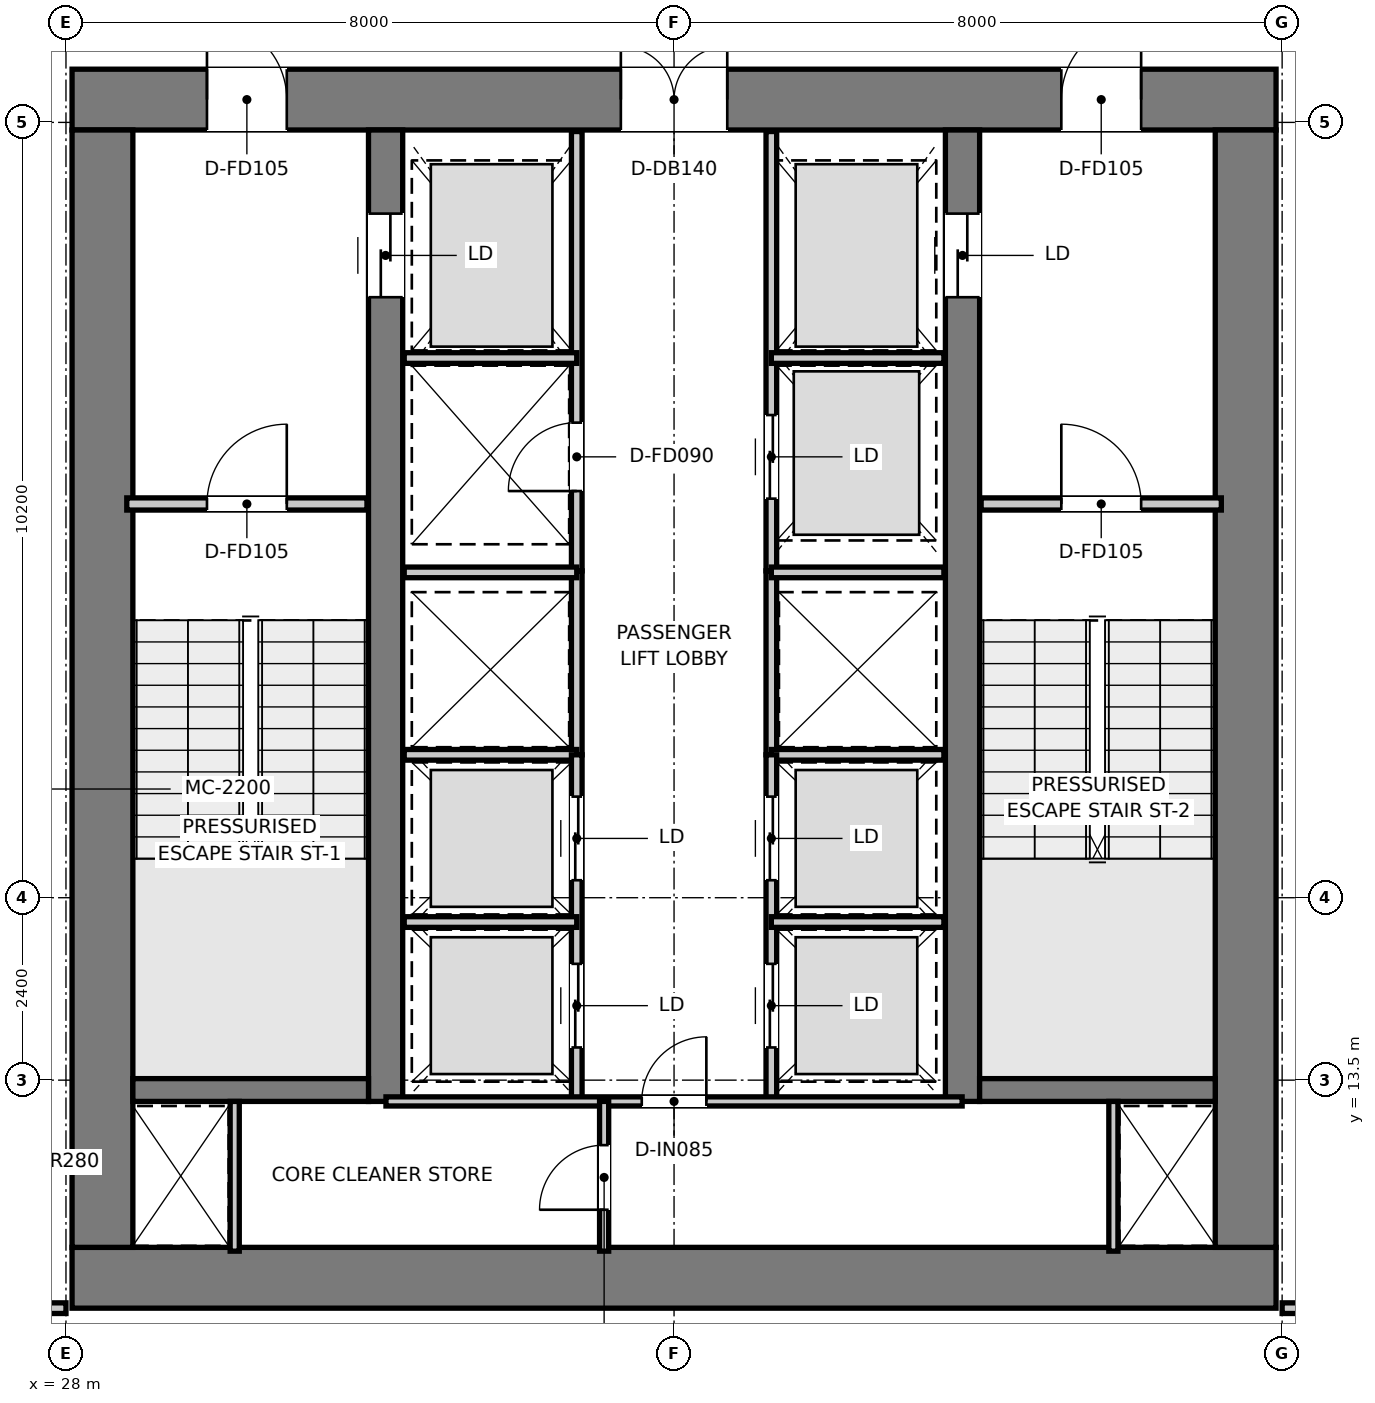
"""IFC4 building model, lengths in metres.
Left out: names, types, materials, properties, quantities, classifications, styles, units other than length and angle.
Written with IfcOpenShell. Run it as: python <this file> out.ifc"""

import sys

from ifc_helpers import new_model, si_unit, direction, frame, frame_2d, origin, place, context, subcontext, project, spatial, rectangle, extrude, element, fill, save


model = new_model("IFC4")
c1 = context("Model", 3, precision=1e-05, world=origin(), true_north=direction((0.0, 1.0)))
c2 = subcontext(c1, "Body", "Model", "MODEL_VIEW")
j1 = project(units=[si_unit("LENGTHUNIT", "METRE"), si_unit("PLANEANGLEUNIT", "RADIAN")], contexts=[c1])
p1 = place(None, origin())
s1 = spatial("IfcSite", under=j1, at=p1, CompositionType="ELEMENT")
p2 = place(p1, origin())
s2 = spatial("IfcBuilding", under=s1, at=p2, CompositionType="ELEMENT")
p3 = place(p2, frame((0.0, 0.0, 36.85)))
s3 = spatial("IfcBuildingStorey", under=s2, at=p3, CompositionType="ELEMENT", Elevation=36.85)
p4 = place(p3, frame((28.08, 10.9, 0.0), z_axis=(0.0, 0.0, 1.0), x_axis=(1.0, 0.0, 0.0)))
e1 = element("IfcWall", 1, at=p4, inside=s3, PredefinedType="SHEAR", context=c2, shape_type="SweptSolid", body=[
    extrude(rectangle(XDim=15.84, YDim=0.8, at=frame_2d((7.92, 0.0))), origin(), (0.0, 0.0, 1.0), 3.95),
])
p5 = place(p3, frame((28.08, 26.4, 0.0), z_axis=(0.0, 0.0, 1.0), x_axis=(1.0, 0.0, 0.0)))
e2 = element("IfcWall", 2, at=p5, inside=s3, PredefinedType="SHEAR", context=c2, shape_type="SweptSolid", body=[
    extrude(rectangle(XDim=15.84, YDim=0.8, at=frame_2d((7.92, 0.0))), origin(), (0.0, 0.0, 1.0), 3.95),
])
p6 = place(p5, frame((7.22, 0.0, 0.0)))
e3 = element("IfcOpeningElement", 3, at=p6, cuts=e2, PredefinedType="OPENING", context=c2, shape_type="SweptSolid", body=[
    extrude(rectangle(XDim=1.4, YDim=2.2, at=frame_2d((0.7, 1.1))), frame((0.0, 0.41, 0.0), z_axis=(0.0, -1.0, 0.0), x_axis=(1.0, 0.0, 0.0)), (0.0, 0.0, 1.0), 0.82),
])
p7 = place(p5, frame((1.775, 0.0, 0.0)))
e4 = element("IfcOpeningElement", 4, at=p7, cuts=e2, PredefinedType="OPENING", context=c2, shape_type="SweptSolid", body=[
    extrude(rectangle(XDim=1.05, YDim=2.1, at=frame_2d((0.525, 1.05))), frame((0.0, 0.41, 0.0), z_axis=(0.0, -1.0, 0.0), x_axis=(1.0, 0.0, 0.0)), (0.0, 0.0, 1.0), 0.82),
])
p8 = place(p5, frame((13.015, 0.0, 0.0)))
e5 = element("IfcOpeningElement", 5, at=p8, cuts=e2, PredefinedType="OPENING", context=c2, shape_type="SweptSolid", body=[
    extrude(rectangle(XDim=1.05, YDim=2.1, at=frame_2d((0.525, 1.05))), frame((0.0, 0.41, 0.0), z_axis=(0.0, -1.0, 0.0), x_axis=(1.0, 0.0, 0.0)), (0.0, 0.0, 1.0), 0.82),
])
for number, where, z_axis, x_axis in (
    (6, (28.48, 11.3, 0.0), (0.0, 0.0, 1.0), (0.0, 1.0, 0.0)),
    (7, (43.52, 11.3, 0.0), (0.0, 0.0, 1.0), (0.0, 1.0, 0.0)),
):
    element("IfcWall", number, at=place(p3, frame(where, z_axis=z_axis, x_axis=x_axis)), inside=s3, PredefinedType="SHEAR", context=c2, shape_type="SweptSolid", body=[
        extrude(rectangle(XDim=14.7, YDim=0.8, at=frame_2d((7.35, 0.0))), origin(), (0.0, 0.0, 1.0), 3.95),
    ])
p9 = place(p3, frame((32.205, 13.22, 0.0), z_axis=(0.0, 0.0, 1.0), x_axis=(0.0, 1.0, 0.0)))
e8 = element("IfcWall", 8, at=p9, inside=s3, PredefinedType="SHEAR", context=c2, shape_type="SweptSolid", body=[
    extrude(rectangle(XDim=12.78, YDim=0.45, at=frame_2d((6.39, 0.0))), origin(), (0.0, 0.0, 1.0), 3.95),
])
p10 = place(p9, frame((10.58, 0.0, 0.0)))
e9 = element("IfcOpeningElement", 9, at=p10, cuts=e8, PredefinedType="OPENING", context=c2, shape_type="SweptSolid", body=[
    extrude(rectangle(XDim=1.1, YDim=2.15, at=frame_2d((0.55, 1.075))), frame((0.0, 0.235, 0.0), z_axis=(0.0, -1.0, 0.0), x_axis=(1.0, 0.0, 0.0)), (0.0, 0.0, 1.0), 0.47),
])
p11 = place(p3, frame((39.795, 13.22, 0.0), z_axis=(0.0, 0.0, 1.0), x_axis=(0.0, 1.0, 0.0)))
e10 = element("IfcWall", 10, at=p11, inside=s3, PredefinedType="SHEAR", context=c2, shape_type="SweptSolid", body=[
    extrude(rectangle(XDim=12.78, YDim=0.45, at=frame_2d((6.39, 0.0))), origin(), (0.0, 0.0, 1.0), 3.95),
])
p12 = place(p11, frame((10.58, 0.0, 0.0)))
e11 = element("IfcOpeningElement", 11, at=p12, cuts=e10, PredefinedType="OPENING", context=c2, shape_type="SweptSolid", body=[
    extrude(rectangle(XDim=1.1, YDim=2.15, at=frame_2d((0.55, 1.075))), frame((0.0, 0.235, 0.0), z_axis=(0.0, -1.0, 0.0), x_axis=(1.0, 0.0, 0.0)), (0.0, 0.0, 1.0), 0.47),
])
for number, where, z_axis, x_axis in (
    (12, (28.88, 13.37, 0.0), (0.0, 0.0, 1.0), (1.0, 0.0, 0.0)),
    (13, (40.02, 13.37, 0.0), (0.0, 0.0, 1.0), (1.0, 0.0, 0.0)),
):
    element("IfcWall", number, at=place(p3, frame(where, z_axis=z_axis, x_axis=x_axis)), inside=s3, PredefinedType="SHEAR", context=c2, shape_type="SweptSolid", body=[
        extrude(rectangle(XDim=3.1, YDim=0.3, at=frame_2d((1.55, 0.0))), origin(), (0.0, 0.0, 1.0), 3.95),
    ])
p13 = place(p3, frame((28.8, 21.08, 0.0), z_axis=(0.0, 0.0, 1.0), x_axis=(1.0, 0.0, 0.0)))
e14 = element("IfcWall", 14, at=p13, inside=s3, PredefinedType="PARTITIONING", context=c2, shape_type="SweptSolid", body=[
    extrude(rectangle(XDim=3.16, YDim=0.16, at=frame_2d((1.58, 0.0))), origin(), (0.0, 0.0, 1.0), 3.67),
])
p14 = place(p13, frame((1.055, 0.0, 0.0)))
e15 = element("IfcOpeningElement", 15, at=p14, cuts=e14, PredefinedType="OPENING", context=c2, shape_type="SweptSolid", body=[
    extrude(rectangle(XDim=1.05, YDim=2.1, at=frame_2d((0.525, 1.05))), frame((0.0, 0.09, 0.0), z_axis=(0.0, -1.0, 0.0), x_axis=(1.0, 0.0, 0.0)), (0.0, 0.0, 1.0), 0.18),
])
p15 = place(p3, frame((40.04, 21.08, 0.0), z_axis=(0.0, 0.0, 1.0), x_axis=(1.0, 0.0, 0.0)))
e16 = element("IfcWall", 16, at=p15, inside=s3, PredefinedType="PARTITIONING", context=c2, shape_type="SweptSolid", body=[
    extrude(rectangle(XDim=3.16, YDim=0.16, at=frame_2d((1.58, 0.0))), origin(), (0.0, 0.0, 1.0), 3.67),
])
p16 = place(p15, frame((1.055, 0.0, 0.0)))
e17 = element("IfcOpeningElement", 17, at=p16, cuts=e16, PredefinedType="OPENING", context=c2, shape_type="SweptSolid", body=[
    extrude(rectangle(XDim=1.05, YDim=2.1, at=frame_2d((0.525, 1.05))), frame((0.0, 0.09, 0.0), z_axis=(0.0, -1.0, 0.0), x_axis=(1.0, 0.0, 0.0)), (0.0, 0.0, 1.0), 0.18),
])
p17 = place(p3, frame((34.72, 20.2, 0.0), z_axis=(0.0, 0.0, 1.0), x_axis=(0.0, 1.0, 0.0)))
e18 = element("IfcWall", 18, at=p17, inside=s3, PredefinedType="PARTITIONING", context=c2, shape_type="SweptSolid", body=[
    extrude(rectangle(XDim=5.78, YDim=0.14, at=frame_2d((2.89, 0.0))), origin(), (0.0, 0.0, 1.0), 2.47),
])
p18 = place(p17, frame((1.05, 0.0, 0.0)))
e19 = element("IfcOpeningElement", 19, at=p18, cuts=e18, PredefinedType="OPENING", context=c2, shape_type="SweptSolid", body=[
    extrude(rectangle(XDim=0.9, YDim=2.1, at=frame_2d((0.45, 1.05))), frame((0.0, 0.08, 0.0), z_axis=(0.0, -1.0, 0.0), x_axis=(1.0, 0.0, 0.0)), (0.0, 0.0, 1.0), 0.16),
])
p19 = place(p3, frame((37.28, 20.2, 0.0), z_axis=(0.0, 0.0, 1.0), x_axis=(0.0, 1.0, 0.0)))
e20 = element("IfcWall", 20, at=p19, inside=s3, PredefinedType="PARTITIONING", context=c2, shape_type="SweptSolid", body=[
    extrude(rectangle(XDim=5.78, YDim=0.14, at=frame_2d((2.89, 0.0))), origin(), (0.0, 0.0, 1.0), 2.47),
])
p20 = place(p19, frame((0.95, 0.0, 0.0)))
e21 = element("IfcOpeningElement", 21, at=p20, cuts=e20, PredefinedType="OPENING", context=c2, shape_type="SweptSolid", body=[
    extrude(rectangle(XDim=1.1, YDim=2.15, at=frame_2d((0.55, 1.075))), frame((0.0, 0.08, 0.0), z_axis=(0.0, -1.0, 0.0), x_axis=(1.0, 0.0, 0.0)), (0.0, 0.0, 1.0), 0.16),
])
for number, where, z_axis, x_axis in (
    (22, (32.45, 23.0, 0.0), (0.0, 0.0, 1.0), (1.0, 0.0, 0.0)),
    (23, (37.28, 23.0, 0.0), (0.0, 0.0, 1.0), (1.0, 0.0, 0.0)),
):
    element("IfcWall", number, at=place(p3, frame(where, z_axis=z_axis, x_axis=x_axis)), inside=s3, PredefinedType="PARTITIONING", context=c2, shape_type="SweptSolid", body=[
        extrude(rectangle(XDim=2.27, YDim=0.14, at=frame_2d((1.135, 0.0))), origin(), (0.0, 0.0, 1.0), 2.47),
    ])
for number, where, z_axis, x_axis in (
    (24, (34.72, 17.78, 0.0), (0.0, 0.0, 1.0), (0.0, 1.0, 0.0)),
    (25, (37.28, 17.78, 0.0), (0.0, 0.0, 1.0), (0.0, 1.0, 0.0)),
):
    element("IfcWall", number, at=place(p3, frame(where, z_axis=z_axis, x_axis=x_axis)), inside=s3, PredefinedType="PARTITIONING", context=c2, shape_type="SweptSolid", body=[
        extrude(rectangle(XDim=2.42, YDim=0.14, at=frame_2d((1.21, 0.0))), origin(), (0.0, 0.0, 1.0), 3.67),
    ])
for number, where, z_axis, x_axis in (
    (26, (32.45, 17.78, 0.0), (0.0, 0.0, 1.0), (1.0, 0.0, 0.0)),
    (27, (32.45, 20.18, 0.0), (0.0, 0.0, 1.0), (1.0, 0.0, 0.0)),
    (28, (37.28, 17.78, 0.0), (0.0, 0.0, 1.0), (1.0, 0.0, 0.0)),
    (29, (37.28, 20.18, 0.0), (0.0, 0.0, 1.0), (1.0, 0.0, 0.0)),
):
    element("IfcWall", number, at=place(p3, frame(where, z_axis=z_axis, x_axis=x_axis)), inside=s3, PredefinedType="PARTITIONING", context=c2, shape_type="SweptSolid", body=[
        extrude(rectangle(XDim=2.27, YDim=0.14, at=frame_2d((1.135, 0.0))), origin(), (0.0, 0.0, 1.0), 3.67),
    ])
p21 = place(p3, frame((34.72, 13.22, 0.0), z_axis=(0.0, 0.0, 1.0), x_axis=(0.0, 1.0, 0.0)))
e30 = element("IfcWall", 30, at=p21, inside=s3, PredefinedType="PARTITIONING", context=c2, shape_type="SweptSolid", body=[
    extrude(rectangle(XDim=4.56, YDim=0.14, at=frame_2d((2.28, 0.0))), origin(), (0.0, 0.0, 1.0), 3.67),
])
p22 = place(p21, frame((0.71, 0.0, 0.0)))
e31 = element("IfcOpeningElement", 31, at=p22, cuts=e30, PredefinedType="OPENING", context=c2, shape_type="SweptSolid", body=[
    extrude(rectangle(XDim=1.1, YDim=2.15, at=frame_2d((0.55, 1.075))), frame((0.0, 0.08, 0.0), z_axis=(0.0, -1.0, 0.0), x_axis=(1.0, 0.0, 0.0)), (0.0, 0.0, 1.0), 0.16),
])
p23 = place(p21, frame((2.91, 0.0, 0.0)))
e32 = element("IfcOpeningElement", 32, at=p23, cuts=e30, PredefinedType="OPENING", context=c2, shape_type="SweptSolid", body=[
    extrude(rectangle(XDim=1.1, YDim=2.15, at=frame_2d((0.55, 1.075))), frame((0.0, 0.08, 0.0), z_axis=(0.0, -1.0, 0.0), x_axis=(1.0, 0.0, 0.0)), (0.0, 0.0, 1.0), 0.16),
])
p24 = place(p3, frame((32.45, 15.58, 0.0), z_axis=(0.0, 0.0, 1.0), x_axis=(1.0, 0.0, 0.0)))
e33 = element("IfcWall", 33, at=p24, inside=s3, PredefinedType="PARTITIONING", context=c2, shape_type="SweptSolid", body=[
    extrude(rectangle(XDim=2.27, YDim=0.14, at=frame_2d((1.135, 0.0))), origin(), (0.0, 0.0, 1.0), 3.67),
])
p25 = place(p3, frame((37.28, 13.22, 0.0), z_axis=(0.0, 0.0, 1.0), x_axis=(0.0, 1.0, 0.0)))
e34 = element("IfcWall", 34, at=p25, inside=s3, PredefinedType="PARTITIONING", context=c2, shape_type="SweptSolid", body=[
    extrude(rectangle(XDim=4.56, YDim=0.14, at=frame_2d((2.28, 0.0))), origin(), (0.0, 0.0, 1.0), 3.67),
])
p26 = place(p25, frame((0.71, 0.0, 0.0)))
e35 = element("IfcOpeningElement", 35, at=p26, cuts=e34, PredefinedType="OPENING", context=c2, shape_type="SweptSolid", body=[
    extrude(rectangle(XDim=1.1, YDim=2.15, at=frame_2d((0.55, 1.075))), frame((0.0, 0.08, 0.0), z_axis=(0.0, -1.0, 0.0), x_axis=(1.0, 0.0, 0.0)), (0.0, 0.0, 1.0), 0.16),
])
p27 = place(p25, frame((2.91, 0.0, 0.0)))
e36 = element("IfcOpeningElement", 36, at=p27, cuts=e34, PredefinedType="OPENING", context=c2, shape_type="SweptSolid", body=[
    extrude(rectangle(XDim=1.1, YDim=2.15, at=frame_2d((0.55, 1.075))), frame((0.0, 0.08, 0.0), z_axis=(0.0, -1.0, 0.0), x_axis=(1.0, 0.0, 0.0)), (0.0, 0.0, 1.0), 0.16),
])
p28 = place(p3, frame((37.28, 15.58, 0.0), z_axis=(0.0, 0.0, 1.0), x_axis=(1.0, 0.0, 0.0)))
e37 = element("IfcWall", 37, at=p28, inside=s3, PredefinedType="PARTITIONING", context=c2, shape_type="SweptSolid", body=[
    extrude(rectangle(XDim=2.27, YDim=0.14, at=frame_2d((1.135, 0.0))), origin(), (0.0, 0.0, 1.0), 3.67),
])
for number, where, z_axis, x_axis in (
    (38, (30.22, 11.25, 0.0), (0.0, 0.0, 1.0), (0.0, 1.0, 0.0)),
    (39, (41.78, 11.25, 0.0), (0.0, 0.0, 1.0), (0.0, 1.0, 0.0)),
):
    element("IfcWall", number, at=place(p3, frame(where, z_axis=z_axis, x_axis=x_axis)), inside=s3, PredefinedType="PARTITIONING", context=c2, shape_type="SweptSolid", body=[
        extrude(rectangle(XDim=1.97, YDim=0.12, at=frame_2d((0.985, 0.0))), origin(), (0.0, 0.0, 1.0), 3.67),
    ])
p29 = place(p3, frame((32.21, 13.22, 0.0), z_axis=(0.0, 0.0, 1.0), x_axis=(1.0, 0.0, 0.0)))
e40 = element("IfcWall", 40, at=p29, inside=s3, PredefinedType="PARTITIONING", context=c2, shape_type="SweptSolid", body=[
    extrude(rectangle(XDim=7.58, YDim=0.12, at=frame_2d((3.79, 0.0))), origin(), (0.0, 0.0, 1.0), 3.67),
])
p30 = place(p29, frame((3.365, 0.0, 0.0)))
e41 = element("IfcOpeningElement", 41, at=p30, cuts=e40, PredefinedType="OPENING", context=c2, shape_type="SweptSolid", body=[
    extrude(rectangle(XDim=0.85, YDim=2.1, at=frame_2d((0.425, 1.05))), frame((0.0, 0.07, 0.0), z_axis=(0.0, -1.0, 0.0), x_axis=(1.0, 0.0, 0.0)), (0.0, 0.0, 1.0), 0.14),
])
p31 = place(p3, frame((35.08, 11.25, 0.0), z_axis=(0.0, 0.0, 1.0), x_axis=(0.0, 1.0, 0.0)))
e42 = element("IfcWall", 42, at=p31, inside=s3, PredefinedType="PARTITIONING", context=c2, shape_type="SweptSolid", body=[
    extrude(rectangle(XDim=1.97, YDim=0.12, at=frame_2d((0.985, 0.0))), origin(), (0.0, 0.0, 1.0), 3.67),
])
p32 = place(p31, frame((0.545, 0.0, 0.0)))
e43 = element("IfcOpeningElement", 43, at=p32, cuts=e42, PredefinedType="OPENING", context=c2, shape_type="SweptSolid", body=[
    extrude(rectangle(XDim=0.85, YDim=2.1, at=frame_2d((0.425, 1.05))), frame((0.0, 0.07, 0.0), z_axis=(0.0, -1.0, 0.0), x_axis=(1.0, 0.0, 0.0)), (0.0, 0.0, 1.0), 0.14),
])
p33 = place(p3, frame((26.32, 10.5, 0.0), z_axis=(0.0, 0.0, 1.0), x_axis=(1.0, 0.0, 0.0)))
e44 = element("IfcWall", 44, at=p33, inside=s3, PredefinedType="PARTITIONING", context=c2, shape_type="SweptSolid", body=[
    extrude(rectangle(XDim=1.68, YDim=0.14, at=frame_2d((0.84, 0.0))), origin(), (0.0, 0.0, 1.0), 3.67),
])
p34 = place(p33, frame((0.445, 0.0, 0.0)))
e45 = element("IfcOpeningElement", 45, at=p34, cuts=e44, PredefinedType="OPENING", context=c2, shape_type="SweptSolid", body=[
    extrude(rectangle(XDim=0.85, YDim=2.1, at=frame_2d((0.425, 1.05))), frame((0.0, 0.08, 0.0), z_axis=(0.0, -1.0, 0.0), x_axis=(1.0, 0.0, 0.0)), (0.0, 0.0, 1.0), 0.16),
])
p35 = place(p3, frame((44.0, 10.5, 0.0), z_axis=(0.0, 0.0, 1.0), x_axis=(1.0, 0.0, 0.0)))
e46 = element("IfcWall", 46, at=p35, inside=s3, PredefinedType="PARTITIONING", context=c2, shape_type="SweptSolid", body=[
    extrude(rectangle(XDim=1.68, YDim=0.14, at=frame_2d((0.84, 0.0))), origin(), (0.0, 0.0, 1.0), 3.67),
])
p36 = place(p14, origin())
e47 = element("IfcDoor", 47, at=p36, inside=s3, OperationType="SINGLE_SWING_RIGHT", PredefinedType="DOOR", context=c2, shape_type="SweptSolid", body=[
    extrude(rectangle(XDim=1.05, YDim=2.1, at=frame_2d((0.525, 1.05))), frame((0.0, 0.025, 0.0), z_axis=(0.0, -1.0, 0.0), x_axis=(1.0, 0.0, 0.0)), (0.0, 0.0, 1.0), 0.05),
])
fill(e15, e47)
p37 = place(p16, origin())
e48 = element("IfcDoor", 48, at=p37, inside=s3, OperationType="SINGLE_SWING_LEFT", PredefinedType="DOOR", context=c2, shape_type="SweptSolid", body=[
    extrude(rectangle(XDim=1.05, YDim=2.1, at=frame_2d((0.525, 1.05))), frame((0.0, 0.025, 0.0), z_axis=(0.0, -1.0, 0.0), x_axis=(1.0, 0.0, 0.0)), (0.0, 0.0, 1.0), 0.05),
])
fill(e17, e48)
p38 = place(p6, origin())
e49 = element("IfcDoor", 49, at=p38, inside=s3, OperationType="DOUBLE_DOOR_SINGLE_SWING", PredefinedType="DOOR", context=c2, shape_type="SweptSolid", body=[
    extrude(rectangle(XDim=1.4, YDim=2.2, at=frame_2d((0.7, 1.1))), frame((0.0, 0.025, 0.0), z_axis=(0.0, -1.0, 0.0), x_axis=(1.0, 0.0, 0.0)), (0.0, 0.0, 1.0), 0.05),
])
fill(e3, e49)
p39 = place(p7, origin())
e50 = element("IfcDoor", 50, at=p39, inside=s3, OperationType="SINGLE_SWING_LEFT", PredefinedType="DOOR", context=c2, shape_type="SweptSolid", body=[
    extrude(rectangle(XDim=1.05, YDim=2.1, at=frame_2d((0.525, 1.05))), frame((0.0, 0.025, 0.0), z_axis=(0.0, -1.0, 0.0), x_axis=(1.0, 0.0, 0.0)), (0.0, 0.0, 1.0), 0.05),
])
fill(e4, e50)
p40 = place(p8, origin())
e51 = element("IfcDoor", 51, at=p40, inside=s3, OperationType="SINGLE_SWING_RIGHT", PredefinedType="DOOR", context=c2, shape_type="SweptSolid", body=[
    extrude(rectangle(XDim=1.05, YDim=2.1, at=frame_2d((0.525, 1.05))), frame((0.0, 0.025, 0.0), z_axis=(0.0, -1.0, 0.0), x_axis=(1.0, 0.0, 0.0)), (0.0, 0.0, 1.0), 0.05),
])
fill(e5, e51)
p41 = place(p10, origin())
e52 = element("IfcDoor", 52, at=p41, inside=s3, OperationType="DOUBLE_DOOR_SLIDING", PredefinedType="DOOR", context=c2, shape_type="SweptSolid", body=[
    extrude(rectangle(XDim=1.1, YDim=2.15, at=frame_2d((0.55, 1.075))), frame((0.0, 0.025, 0.0), z_axis=(0.0, -1.0, 0.0), x_axis=(1.0, 0.0, 0.0)), (0.0, 0.0, 1.0), 0.05),
])
fill(e9, e52)
p42 = place(p12, origin())
e53 = element("IfcDoor", 53, at=p42, inside=s3, OperationType="DOUBLE_DOOR_SLIDING", PredefinedType="DOOR", context=c2, shape_type="SweptSolid", body=[
    extrude(rectangle(XDim=1.1, YDim=2.15, at=frame_2d((0.55, 1.075))), frame((0.0, 0.025, 0.0), z_axis=(0.0, -1.0, 0.0), x_axis=(1.0, 0.0, 0.0)), (0.0, 0.0, 1.0), 0.05),
])
fill(e11, e53)
p43 = place(p18, origin())
e54 = element("IfcDoor", 54, at=p43, inside=s3, OperationType="SINGLE_SWING_LEFT", PredefinedType="DOOR", context=c2, shape_type="SweptSolid", body=[
    extrude(rectangle(XDim=0.9, YDim=2.1, at=frame_2d((0.45, 1.05))), frame((0.0, 0.025, 0.0), z_axis=(0.0, -1.0, 0.0), x_axis=(1.0, 0.0, 0.0)), (0.0, 0.0, 1.0), 0.05),
])
fill(e19, e54)
p44 = place(p20, origin())
e55 = element("IfcDoor", 55, at=p44, inside=s3, OperationType="DOUBLE_DOOR_SLIDING", PredefinedType="DOOR", context=c2, shape_type="SweptSolid", body=[
    extrude(rectangle(XDim=1.1, YDim=2.15, at=frame_2d((0.55, 1.075))), frame((0.0, 0.025, 0.0), z_axis=(0.0, -1.0, 0.0), x_axis=(1.0, 0.0, 0.0)), (0.0, 0.0, 1.0), 0.05),
])
fill(e21, e55)
p45 = place(p22, origin())
e56 = element("IfcDoor", 56, at=p45, inside=s3, OperationType="DOUBLE_DOOR_SLIDING", PredefinedType="DOOR", context=c2, shape_type="SweptSolid", body=[
    extrude(rectangle(XDim=1.1, YDim=2.15, at=frame_2d((0.55, 1.075))), frame((0.0, 0.025, 0.0), z_axis=(0.0, -1.0, 0.0), x_axis=(1.0, 0.0, 0.0)), (0.0, 0.0, 1.0), 0.05),
])
fill(e31, e56)
p46 = place(p23, origin())
e57 = element("IfcDoor", 57, at=p46, inside=s3, OperationType="DOUBLE_DOOR_SLIDING", PredefinedType="DOOR", context=c2, shape_type="SweptSolid", body=[
    extrude(rectangle(XDim=1.1, YDim=2.15, at=frame_2d((0.55, 1.075))), frame((0.0, 0.025, 0.0), z_axis=(0.0, -1.0, 0.0), x_axis=(1.0, 0.0, 0.0)), (0.0, 0.0, 1.0), 0.05),
])
fill(e32, e57)
p47 = place(p26, origin())
e58 = element("IfcDoor", 58, at=p47, inside=s3, OperationType="DOUBLE_DOOR_SLIDING", PredefinedType="DOOR", context=c2, shape_type="SweptSolid", body=[
    extrude(rectangle(XDim=1.1, YDim=2.15, at=frame_2d((0.55, 1.075))), frame((0.0, 0.025, 0.0), z_axis=(0.0, -1.0, 0.0), x_axis=(1.0, 0.0, 0.0)), (0.0, 0.0, 1.0), 0.05),
])
fill(e35, e58)
p48 = place(p27, origin())
e59 = element("IfcDoor", 59, at=p48, inside=s3, OperationType="DOUBLE_DOOR_SLIDING", PredefinedType="DOOR", context=c2, shape_type="SweptSolid", body=[
    extrude(rectangle(XDim=1.1, YDim=2.15, at=frame_2d((0.55, 1.075))), frame((0.0, 0.025, 0.0), z_axis=(0.0, -1.0, 0.0), x_axis=(1.0, 0.0, 0.0)), (0.0, 0.0, 1.0), 0.05),
])
fill(e36, e59)
p49 = place(p30, origin())
e60 = element("IfcDoor", 60, at=p49, inside=s3, OperationType="SINGLE_SWING_RIGHT", PredefinedType="DOOR", context=c2, shape_type="SweptSolid", body=[
    extrude(rectangle(XDim=0.85, YDim=2.1, at=frame_2d((0.425, 1.05))), frame((0.0, 0.025, 0.0), z_axis=(0.0, -1.0, 0.0), x_axis=(1.0, 0.0, 0.0)), (0.0, 0.0, 1.0), 0.05),
])
fill(e41, e60)
p50 = place(p32, origin())
e61 = element("IfcDoor", 61, at=p50, inside=s3, OperationType="SINGLE_SWING_LEFT", PredefinedType="DOOR", context=c2, shape_type="SweptSolid", body=[
    extrude(rectangle(XDim=0.85, YDim=2.1, at=frame_2d((0.425, 1.05))), frame((0.0, 0.025, 0.0), z_axis=(0.0, -1.0, 0.0), x_axis=(1.0, 0.0, 0.0)), (0.0, 0.0, 1.0), 0.05),
])
fill(e43, e61)
save(model, sys.argv[1])
